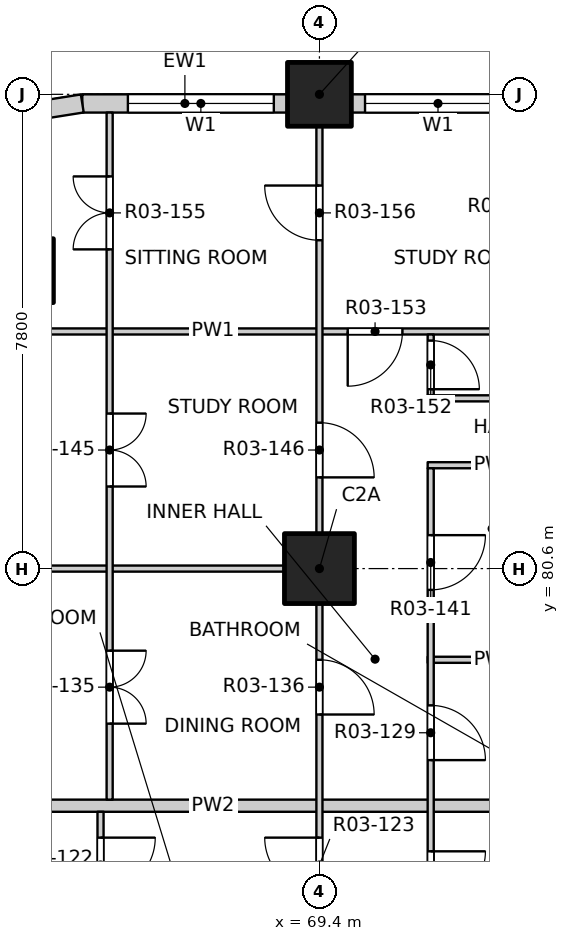
"""IFC4 building model, lengths in metres.
Left out: names, types, materials, properties, quantities, classifications, styles, units other than length and angle.
Written with IfcOpenShell. Run it as: python <this file> out.ifc"""

import sys

from ifc_helpers import new_model, si_unit, direction, frame, frame_2d, origin, origin_2d, place, context, subcontext, project, spatial, rectangle, extrude, element, fill, save


model = new_model("IFC4")
c1 = context("Model", 3, precision=1e-05, world=origin(), true_north=direction((0.0, 1.0)))
c2 = subcontext(c1, "Body", "Model", "MODEL_VIEW")
j1 = project(units=[si_unit("LENGTHUNIT", "METRE"), si_unit("PLANEANGLEUNIT", "RADIAN")], contexts=[c1])
p1 = place(None, origin())
s1 = spatial("IfcSite", under=j1, at=p1, CompositionType="ELEMENT")
p2 = place(p1, origin())
s2 = spatial("IfcBuilding", under=s1, at=p2, CompositionType="ELEMENT")
p3 = place(p2, frame((0.0, 0.0, 43.3)))
s3 = spatial("IfcBuildingStorey", under=s2, at=p3, CompositionType="ELEMENT", Elevation=43.3)
for number, where, z_axis, x_axis in (
    (1, (64.5, 85.5, -0.25), (0.0, 0.0, 1.0), (1.0, 0.0, 0.0)),
    (2, (69.4, 88.4, -0.25), (0.0, 0.0, 1.0), (1.0, 0.0, 0.0)),
):
    element("IfcColumn", number, at=place(p3, frame(where, z_axis=z_axis, x_axis=x_axis)), inside=s3, PredefinedType="COLUMN", context=c2, shape_type="SweptSolid", body=[
        extrude(rectangle(XDim=1.05, YDim=1.05, at=origin_2d()), origin(), (0.0, 0.0, 1.0), 3.35),
    ])
p4 = place(p3, frame((69.4, 80.6, -0.25), z_axis=(0.0, 0.0, 1.0), x_axis=(1.0, 0.0, 0.0)))
e3 = element("IfcColumn", 3, at=p4, inside=s3, PredefinedType="COLUMN", context=c2, shape_type="SweptSolid", body=[
    extrude(rectangle(XDim=1.15, YDim=1.15, at=origin_2d()), origin(), (0.0, 0.0, 1.0), 3.35),
])
p5 = place(p3, frame((65.5, 88.25, 0.0), z_axis=(0.0, 0.0, 1.0), x_axis=(1.0, 0.0, 0.0)))
e4 = element("IfcWall", 4, at=p5, inside=s3, PredefinedType="SOLIDWALL", context=c2, shape_type="SweptSolid", body=[
    extrude(rectangle(XDim=3.375, YDim=0.3, at=frame_2d((1.688, 0.0))), origin(), (0.0, 0.0, 1.0), 3.1),
])
p6 = place(p5, frame((0.75, 0.0, 0.9)))
e5 = element("IfcOpeningElement", 5, at=p6, cuts=e4, PredefinedType="OPENING", context=c2, shape_type="SweptSolid", body=[
    extrude(rectangle(XDim=2.4, YDim=1.8, at=frame_2d((1.2, 0.9))), frame((0.0, 0.16, 0.0), z_axis=(0.0, -1.0, 0.0), x_axis=(1.0, 0.0, 0.0)), (0.0, 0.0, 1.0), 0.32),
])
p7 = place(p3, frame((69.925, 88.25, 0.0), z_axis=(0.0, 0.0, 1.0), x_axis=(1.0, 0.0, 0.0)))
e6 = element("IfcWall", 6, at=p7, inside=s3, PredefinedType="SOLIDWALL", context=c2, shape_type="SweptSolid", body=[
    extrude(rectangle(XDim=6.75, YDim=0.3, at=frame_2d((3.375, 0.0))), origin(), (0.0, 0.0, 1.0), 3.1),
])
p8 = place(p7, frame((0.225, 0.0, 0.9)))
e7 = element("IfcOpeningElement", 7, at=p8, cuts=e6, PredefinedType="OPENING", context=c2, shape_type="SweptSolid", body=[
    extrude(rectangle(XDim=2.4, YDim=1.8, at=frame_2d((1.2, 0.9))), frame((0.0, 0.16, 0.0), z_axis=(0.0, -1.0, 0.0), x_axis=(1.0, 0.0, 0.0)), (0.0, 0.0, 1.0), 0.32),
])
p9 = place(p7, frame((4.125, 0.0, 0.9)))
e8 = element("IfcOpeningElement", 8, at=p9, cuts=e6, PredefinedType="OPENING", context=c2, shape_type="SweptSolid", body=[
    extrude(rectangle(XDim=2.4, YDim=1.8, at=frame_2d((1.2, 0.9))), frame((0.0, 0.16, 0.0), z_axis=(0.0, -1.0, 0.0), x_axis=(1.0, 0.0, 0.0)), (0.0, 0.0, 1.0), 0.32),
])
p10 = place(p3, frame((65.5, 88.25, 0.0), z_axis=(0.0, 0.0, 1.0), x_axis=(-0.987678452879, -0.156496880861, 0.0)))
e9 = element("IfcWall", 9, at=p10, inside=s3, PredefinedType="SOLIDWALL", context=c2, shape_type="SweptSolid", body=[
    extrude(rectangle(XDim=1.173, YDim=0.3, at=frame_2d((0.586, 0.0))), origin(), (0.0, 0.0, 1.0), 3.1),
])
p11 = place(p3, frame((61.9, 76.7, 0.0), z_axis=(0.0, 0.0, 1.0), x_axis=(1.0, 0.0, 0.0)))
e10 = element("IfcWall", 10, at=p11, inside=s3, PredefinedType="PARTITIONING", context=c2, shape_type="SweptSolid", body=[
    extrude(rectangle(XDim=11.5, YDim=0.2, at=frame_2d((5.75, 0.0))), origin(), (0.0, 0.0, 1.0), 3.1),
])
p12 = place(p3, frame((71.18, 79.1, 0.0), z_axis=(0.0, 0.0, 1.0), x_axis=(1.0, 0.0, 0.0)))
e11 = element("IfcWall", 11, at=p12, inside=s3, PredefinedType="PARTITIONING", context=c2, shape_type="SweptSolid", body=[
    extrude(rectangle(XDim=2.22, YDim=0.1, at=frame_2d((1.11, 0.0))), origin(), (0.0, 0.0, 1.0), 3.1),
])
p13 = place(p3, frame((61.9, 80.6, 0.0), z_axis=(0.0, 0.0, 1.0), x_axis=(1.0, 0.0, 0.0)))
e12 = element("IfcWall", 12, at=p13, inside=s3, PredefinedType="PARTITIONING", context=c2, shape_type="SweptSolid", body=[
    extrude(rectangle(XDim=7.55, YDim=0.1, at=frame_2d((3.775, 0.0))), origin(), (0.0, 0.0, 1.0), 3.1),
])
for number, where, z_axis, x_axis in (
    (13, (71.18, 82.3, 0.0), (0.0, 0.0, 1.0), (1.0, 0.0, 0.0)),
    (14, (71.18, 83.4, 0.0), (0.0, 0.0, 1.0), (1.0, 0.0, 0.0)),
):
    element("IfcWall", number, at=place(p3, frame(where, z_axis=z_axis, x_axis=x_axis)), inside=s3, PredefinedType="PARTITIONING", context=c2, shape_type="SweptSolid", body=[
        extrude(rectangle(XDim=2.22, YDim=0.1, at=frame_2d((1.11, 0.0))), origin(), (0.0, 0.0, 1.0), 3.1),
    ])
p14 = place(p3, frame((61.9, 84.5, 0.0), z_axis=(0.0, 0.0, 1.0), x_axis=(1.0, 0.0, 0.0)))
e15 = element("IfcWall", 15, at=p14, inside=s3, PredefinedType="PARTITIONING", context=c2, shape_type="SweptSolid", body=[
    extrude(rectangle(XDim=11.5, YDim=0.1, at=frame_2d((5.75, 0.0))), origin(), (0.0, 0.0, 1.0), 3.1),
])
p15 = place(p14, frame((7.965, 0.0, 0.0)))
e16 = element("IfcOpeningElement", 16, at=p15, cuts=e15, PredefinedType="OPENING", context=c2, shape_type="SweptSolid", body=[
    extrude(rectangle(XDim=0.9, YDim=2.1, at=frame_2d((0.45, 1.05))), frame((0.0, 0.06, 0.0), z_axis=(0.0, -1.0, 0.0), x_axis=(1.0, 0.0, 0.0)), (0.0, 0.0, 1.0), 0.12),
])
p16 = place(p3, frame((65.8, 69.0, 0.0), z_axis=(0.0, 0.0, 1.0), x_axis=(0.0, 1.0, 0.0)))
e17 = element("IfcWall", 17, at=p16, inside=s3, PredefinedType="PARTITIONING", context=c2, shape_type="SweptSolid", body=[
    extrude(rectangle(XDim=7.6, YDim=0.1, at=frame_2d((3.8, 0.0))), origin(), (0.0, 0.0, 1.0), 3.1),
])
p17 = place(p16, frame((1.25, 0.0, 0.0)))
e18 = element("IfcOpeningElement", 18, at=p17, cuts=e17, PredefinedType="OPENING", context=c2, shape_type="SweptSolid", body=[
    extrude(rectangle(XDim=1.2, YDim=2.1, at=frame_2d((0.6, 1.05))), frame((0.0, 0.06, 0.0), z_axis=(0.0, -1.0, 0.0), x_axis=(1.0, 0.0, 0.0)), (0.0, 0.0, 1.0), 0.12),
])
p18 = place(p16, frame((4.325, 0.0, 0.0)))
e19 = element("IfcOpeningElement", 19, at=p18, cuts=e17, PredefinedType="OPENING", context=c2, shape_type="SweptSolid", body=[
    extrude(rectangle(XDim=0.9, YDim=2.1, at=frame_2d((0.45, 1.05))), frame((0.0, 0.06, 0.0), z_axis=(0.0, -1.0, 0.0), x_axis=(1.0, 0.0, 0.0)), (0.0, 0.0, 1.0), 0.12),
])
p19 = place(p16, frame((6.275, 0.0, 0.0)))
e20 = element("IfcOpeningElement", 20, at=p19, cuts=e17, PredefinedType="OPENING", context=c2, shape_type="SweptSolid", body=[
    extrude(rectangle(XDim=0.9, YDim=2.1, at=frame_2d((0.45, 1.05))), frame((0.0, 0.06, 0.0), z_axis=(0.0, -1.0, 0.0), x_axis=(1.0, 0.0, 0.0)), (0.0, 0.0, 1.0), 0.12),
])
p20 = place(p3, frame((65.95, 76.8, 0.0), z_axis=(0.0, 0.0, 1.0), x_axis=(0.0, 1.0, 0.0)))
e21 = element("IfcWall", 21, at=p20, inside=s3, PredefinedType="PARTITIONING", context=c2, shape_type="SweptSolid", body=[
    extrude(rectangle(XDim=11.3, YDim=0.1, at=frame_2d((5.65, 0.0))), origin(), (0.0, 0.0, 1.0), 3.1),
])
p21 = place(p20, frame((1.25, 0.0, 0.0)))
e22 = element("IfcOpeningElement", 22, at=p21, cuts=e21, PredefinedType="OPENING", context=c2, shape_type="SweptSolid", body=[
    extrude(rectangle(XDim=1.2, YDim=2.1, at=frame_2d((0.6, 1.05))), frame((0.0, 0.06, 0.0), z_axis=(0.0, -1.0, 0.0), x_axis=(1.0, 0.0, 0.0)), (0.0, 0.0, 1.0), 0.12),
])
p22 = place(p20, frame((5.15, 0.0, 0.0)))
e23 = element("IfcOpeningElement", 23, at=p22, cuts=e21, PredefinedType="OPENING", context=c2, shape_type="SweptSolid", body=[
    extrude(rectangle(XDim=1.2, YDim=2.1, at=frame_2d((0.6, 1.05))), frame((0.0, 0.06, 0.0), z_axis=(0.0, -1.0, 0.0), x_axis=(1.0, 0.0, 0.0)), (0.0, 0.0, 1.0), 0.12),
])
p23 = place(p20, frame((9.05, 0.0, 0.0)))
e24 = element("IfcOpeningElement", 24, at=p23, cuts=e21, PredefinedType="OPENING", context=c2, shape_type="SweptSolid", body=[
    extrude(rectangle(XDim=1.2, YDim=2.1, at=frame_2d((0.6, 1.05))), frame((0.0, 0.06, 0.0), z_axis=(0.0, -1.0, 0.0), x_axis=(1.0, 0.0, 0.0)), (0.0, 0.0, 1.0), 0.12),
])
p24 = place(p3, frame((69.4, 41.9, 0.0), z_axis=(0.0, 0.0, 1.0), x_axis=(0.0, 1.0, 0.0)))
e25 = element("IfcWall", 25, at=p24, inside=s3, PredefinedType="PARTITIONING", context=c2, shape_type="SweptSolid", body=[
    extrude(rectangle(XDim=46.2, YDim=0.1, at=frame_2d((23.1, 0.0))), origin(), (0.0, 0.0, 1.0), 3.1),
])
p25 = place(p24, frame((1.2, 0.0, 0.0)))
e26 = element("IfcOpeningElement", 26, at=p25, cuts=e25, PredefinedType="OPENING", context=c2, shape_type="SweptSolid", body=[
    extrude(rectangle(XDim=0.9, YDim=2.1, at=frame_2d((0.45, 1.05))), frame((0.0, 0.06, 0.0), z_axis=(0.0, -1.0, 0.0), x_axis=(1.0, 0.0, 0.0)), (0.0, 0.0, 1.0), 0.12),
])
p26 = place(p24, frame((5.9, 0.0, 0.0)))
e27 = element("IfcOpeningElement", 27, at=p26, cuts=e25, PredefinedType="OPENING", context=c2, shape_type="SweptSolid", body=[
    extrude(rectangle(XDim=0.9, YDim=2.1, at=frame_2d((0.45, 1.05))), frame((0.0, 0.06, 0.0), z_axis=(0.0, -1.0, 0.0), x_axis=(1.0, 0.0, 0.0)), (0.0, 0.0, 1.0), 0.12),
])
p27 = place(p24, frame((9.0, 0.0, 0.0)))
e28 = element("IfcOpeningElement", 28, at=p27, cuts=e25, PredefinedType="OPENING", context=c2, shape_type="SweptSolid", body=[
    extrude(rectangle(XDim=0.9, YDim=2.1, at=frame_2d((0.45, 1.05))), frame((0.0, 0.06, 0.0), z_axis=(0.0, -1.0, 0.0), x_axis=(1.0, 0.0, 0.0)), (0.0, 0.0, 1.0), 0.12),
])
p28 = place(p24, frame((13.725, 0.0, 0.0)))
e29 = element("IfcOpeningElement", 29, at=p28, cuts=e25, PredefinedType="OPENING", context=c2, shape_type="SweptSolid", body=[
    extrude(rectangle(XDim=0.9, YDim=2.1, at=frame_2d((0.45, 1.05))), frame((0.0, 0.06, 0.0), z_axis=(0.0, -1.0, 0.0), x_axis=(1.0, 0.0, 0.0)), (0.0, 0.0, 1.0), 0.12),
])
p29 = place(p24, frame((17.775, 0.0, 0.0)))
e30 = element("IfcOpeningElement", 30, at=p29, cuts=e25, PredefinedType="OPENING", context=c2, shape_type="SweptSolid", body=[
    extrude(rectangle(XDim=0.9, YDim=2.1, at=frame_2d((0.45, 1.05))), frame((0.0, 0.06, 0.0), z_axis=(0.0, -1.0, 0.0), x_axis=(1.0, 0.0, 0.0)), (0.0, 0.0, 1.0), 0.12),
])
p30 = place(p24, frame((20.7, 0.0, 0.0)))
e31 = element("IfcOpeningElement", 31, at=p30, cuts=e25, PredefinedType="OPENING", context=c2, shape_type="SweptSolid", body=[
    extrude(rectangle(XDim=0.9, YDim=2.1, at=frame_2d((0.45, 1.05))), frame((0.0, 0.06, 0.0), z_axis=(0.0, -1.0, 0.0), x_axis=(1.0, 0.0, 0.0)), (0.0, 0.0, 1.0), 0.12),
])
p31 = place(p24, frame((25.575, 0.0, 0.0)))
e32 = element("IfcOpeningElement", 32, at=p31, cuts=e25, PredefinedType="OPENING", context=c2, shape_type="SweptSolid", body=[
    extrude(rectangle(XDim=0.9, YDim=2.1, at=frame_2d((0.45, 1.05))), frame((0.0, 0.06, 0.0), z_axis=(0.0, -1.0, 0.0), x_axis=(1.0, 0.0, 0.0)), (0.0, 0.0, 1.0), 0.12),
])
p32 = place(p24, frame((28.5, 0.0, 0.0)))
e33 = element("IfcOpeningElement", 33, at=p32, cuts=e25, PredefinedType="OPENING", context=c2, shape_type="SweptSolid", body=[
    extrude(rectangle(XDim=0.9, YDim=2.1, at=frame_2d((0.45, 1.05))), frame((0.0, 0.06, 0.0), z_axis=(0.0, -1.0, 0.0), x_axis=(1.0, 0.0, 0.0)), (0.0, 0.0, 1.0), 0.12),
])
p33 = place(p24, frame((33.375, 0.0, 0.0)))
e34 = element("IfcOpeningElement", 34, at=p33, cuts=e25, PredefinedType="OPENING", context=c2, shape_type="SweptSolid", body=[
    extrude(rectangle(XDim=0.9, YDim=2.1, at=frame_2d((0.45, 1.05))), frame((0.0, 0.06, 0.0), z_axis=(0.0, -1.0, 0.0), x_axis=(1.0, 0.0, 0.0)), (0.0, 0.0, 1.0), 0.12),
])
p34 = place(p24, frame((36.3, 0.0, 0.0)))
e35 = element("IfcOpeningElement", 35, at=p34, cuts=e25, PredefinedType="OPENING", context=c2, shape_type="SweptSolid", body=[
    extrude(rectangle(XDim=0.9, YDim=2.1, at=frame_2d((0.45, 1.05))), frame((0.0, 0.06, 0.0), z_axis=(0.0, -1.0, 0.0), x_axis=(1.0, 0.0, 0.0)), (0.0, 0.0, 1.0), 0.12),
])
p35 = place(p24, frame((40.2, 0.0, 0.0)))
e36 = element("IfcOpeningElement", 36, at=p35, cuts=e25, PredefinedType="OPENING", context=c2, shape_type="SweptSolid", body=[
    extrude(rectangle(XDim=0.9, YDim=2.1, at=frame_2d((0.45, 1.05))), frame((0.0, 0.06, 0.0), z_axis=(0.0, -1.0, 0.0), x_axis=(1.0, 0.0, 0.0)), (0.0, 0.0, 1.0), 0.12),
])
p36 = place(p24, frame((44.1, 0.0, 0.0)))
e37 = element("IfcOpeningElement", 37, at=p36, cuts=e25, PredefinedType="OPENING", context=c2, shape_type="SweptSolid", body=[
    extrude(rectangle(XDim=0.9, YDim=2.1, at=frame_2d((0.45, 1.05))), frame((0.0, 0.06, 0.0), z_axis=(0.0, -1.0, 0.0), x_axis=(1.0, 0.0, 0.0)), (0.0, 0.0, 1.0), 0.12),
])
p37 = place(p3, frame((71.23, 71.3, 0.0), z_axis=(0.0, 0.0, 1.0), x_axis=(0.0, 1.0, 0.0)))
e38 = element("IfcWall", 38, at=p37, inside=s3, PredefinedType="PARTITIONING", context=c2, shape_type="SweptSolid", body=[
    extrude(rectangle(XDim=10.95, YDim=0.1, at=frame_2d((5.475, 0.0))), origin(), (0.0, 0.0, 1.0), 3.1),
])
p38 = place(p37, frame((1.025, 0.0, 0.0)))
e39 = element("IfcOpeningElement", 39, at=p38, cuts=e38, PredefinedType="OPENING", context=c2, shape_type="SweptSolid", body=[
    extrude(rectangle(XDim=0.9, YDim=2.1, at=frame_2d((0.45, 1.05))), frame((0.0, 0.06, 0.0), z_axis=(0.0, -1.0, 0.0), x_axis=(1.0, 0.0, 0.0)), (0.0, 0.0, 1.0), 0.12),
])
p39 = place(p37, frame((3.75, 0.0, 0.0)))
e40 = element("IfcOpeningElement", 40, at=p39, cuts=e38, PredefinedType="OPENING", context=c2, shape_type="SweptSolid", body=[
    extrude(rectangle(XDim=0.9, YDim=2.1, at=frame_2d((0.45, 1.05))), frame((0.0, 0.06, 0.0), z_axis=(0.0, -1.0, 0.0), x_axis=(1.0, 0.0, 0.0)), (0.0, 0.0, 1.0), 0.12),
])
p40 = place(p37, frame((6.15, 0.0, 0.0)))
e41 = element("IfcOpeningElement", 41, at=p40, cuts=e38, PredefinedType="OPENING", context=c2, shape_type="SweptSolid", body=[
    extrude(rectangle(XDim=0.9, YDim=2.1, at=frame_2d((0.45, 1.05))), frame((0.0, 0.06, 0.0), z_axis=(0.0, -1.0, 0.0), x_axis=(1.0, 0.0, 0.0)), (0.0, 0.0, 1.0), 0.12),
])
p41 = place(p37, frame((8.95, 0.0, 0.0)))
e42 = element("IfcOpeningElement", 42, at=p41, cuts=e38, PredefinedType="OPENING", context=c2, shape_type="SweptSolid", body=[
    extrude(rectangle(XDim=0.9, YDim=2.1, at=frame_2d((0.45, 1.05))), frame((0.0, 0.06, 0.0), z_axis=(0.0, -1.0, 0.0), x_axis=(1.0, 0.0, 0.0)), (0.0, 0.0, 1.0), 0.12),
])
p42 = place(p3, frame((71.23, 83.45, 0.0), z_axis=(0.0, 0.0, 1.0), x_axis=(0.0, 1.0, 0.0)))
e43 = element("IfcWall", 43, at=p42, inside=s3, PredefinedType="PARTITIONING", context=c2, shape_type="SweptSolid", body=[
    extrude(rectangle(XDim=1.0, YDim=0.1, at=frame_2d((0.5, 0.0))), origin(), (0.0, 0.0, 1.0), 3.1),
])
p43 = place(p42, frame((0.1, 0.0, 0.0)))
e44 = element("IfcOpeningElement", 44, at=p43, cuts=e43, PredefinedType="OPENING", context=c2, shape_type="SweptSolid", body=[
    extrude(rectangle(XDim=0.8, YDim=2.1, at=frame_2d((0.4, 1.05))), frame((0.0, 0.06, 0.0), z_axis=(0.0, -1.0, 0.0), x_axis=(1.0, 0.0, 0.0)), (0.0, 0.0, 1.0), 0.12),
])
p44 = place(p6, origin())
e45 = element("IfcWindow", 45, at=p44, inside=s3, PartitioningType="DOUBLE_PANEL_VERTICAL", PredefinedType="WINDOW", context=c2, shape_type="SweptSolid", body=[
    extrude(rectangle(XDim=2.4, YDim=1.8, at=frame_2d((1.2, 0.9))), frame((0.0, 0.03, 0.0), z_axis=(0.0, -1.0, 0.0), x_axis=(1.0, 0.0, 0.0)), (0.0, 0.0, 1.0), 0.06),
])
fill(e5, e45)
p45 = place(p8, origin())
e46 = element("IfcWindow", 46, at=p45, inside=s3, PartitioningType="DOUBLE_PANEL_VERTICAL", PredefinedType="WINDOW", context=c2, shape_type="SweptSolid", body=[
    extrude(rectangle(XDim=2.4, YDim=1.8, at=frame_2d((1.2, 0.9))), frame((0.0, 0.03, 0.0), z_axis=(0.0, -1.0, 0.0), x_axis=(1.0, 0.0, 0.0)), (0.0, 0.0, 1.0), 0.06),
])
fill(e7, e46)
p46 = place(p39, origin())
e47 = element("IfcDoor", 47, at=p46, inside=s3, OperationType="SINGLE_SWING_LEFT", PredefinedType="DOOR", context=c2, shape_type="SweptSolid", body=[
    extrude(rectangle(XDim=0.9, YDim=2.1, at=frame_2d((0.45, 1.05))), frame((0.0, 0.025, 0.0), z_axis=(0.0, -1.0, 0.0), x_axis=(1.0, 0.0, 0.0)), (0.0, 0.0, 1.0), 0.05),
])
fill(e40, e47)
p47 = place(p19, origin())
e48 = element("IfcDoor", 48, at=p47, inside=s3, OperationType="SINGLE_SWING_LEFT", PredefinedType="DOOR", context=c2, shape_type="SweptSolid", body=[
    extrude(rectangle(XDim=0.9, YDim=2.1, at=frame_2d((0.45, 1.05))), frame((0.0, 0.025, 0.0), z_axis=(0.0, -1.0, 0.0), x_axis=(1.0, 0.0, 0.0)), (0.0, 0.0, 1.0), 0.05),
])
fill(e20, e48)
p48 = place(p33, origin())
e49 = element("IfcDoor", 49, at=p48, inside=s3, OperationType="SINGLE_SWING_RIGHT", PredefinedType="DOOR", context=c2, shape_type="SweptSolid", body=[
    extrude(rectangle(XDim=0.9, YDim=2.1, at=frame_2d((0.45, 1.05))), frame((0.0, 0.025, 0.0), z_axis=(0.0, -1.0, 0.0), x_axis=(1.0, 0.0, 0.0)), (0.0, 0.0, 1.0), 0.05),
])
fill(e34, e49)
p49 = place(p40, origin())
e50 = element("IfcDoor", 50, at=p49, inside=s3, OperationType="SINGLE_SWING_RIGHT", PredefinedType="DOOR", context=c2, shape_type="SweptSolid", body=[
    extrude(rectangle(XDim=0.9, YDim=2.1, at=frame_2d((0.45, 1.05))), frame((0.0, 0.025, 0.0), z_axis=(0.0, -1.0, 0.0), x_axis=(1.0, 0.0, 0.0)), (0.0, 0.0, 1.0), 0.05),
])
fill(e41, e50)
p50 = place(p21, origin())
e51 = element("IfcDoor", 51, at=p50, inside=s3, OperationType="DOUBLE_DOOR_SINGLE_SWING", PredefinedType="DOOR", context=c2, shape_type="SweptSolid", body=[
    extrude(rectangle(XDim=1.2, YDim=2.1, at=frame_2d((0.6, 1.05))), frame((0.0, 0.025, 0.0), z_axis=(0.0, -1.0, 0.0), x_axis=(1.0, 0.0, 0.0)), (0.0, 0.0, 1.0), 0.05),
])
fill(e22, e51)
p51 = place(p34, origin())
e52 = element("IfcDoor", 52, at=p51, inside=s3, OperationType="SINGLE_SWING_RIGHT", PredefinedType="DOOR", context=c2, shape_type="SweptSolid", body=[
    extrude(rectangle(XDim=0.9, YDim=2.1, at=frame_2d((0.45, 1.05))), frame((0.0, 0.025, 0.0), z_axis=(0.0, -1.0, 0.0), x_axis=(1.0, 0.0, 0.0)), (0.0, 0.0, 1.0), 0.05),
])
fill(e35, e52)
p52 = place(p41, origin())
e53 = element("IfcDoor", 53, at=p52, inside=s3, OperationType="SINGLE_SWING_LEFT", PredefinedType="DOOR", context=c2, shape_type="SweptSolid", body=[
    extrude(rectangle(XDim=0.9, YDim=2.1, at=frame_2d((0.45, 1.05))), frame((0.0, 0.025, 0.0), z_axis=(0.0, -1.0, 0.0), x_axis=(1.0, 0.0, 0.0)), (0.0, 0.0, 1.0), 0.05),
])
fill(e42, e53)
p53 = place(p22, origin())
e54 = element("IfcDoor", 54, at=p53, inside=s3, OperationType="DOUBLE_DOOR_SINGLE_SWING", PredefinedType="DOOR", context=c2, shape_type="SweptSolid", body=[
    extrude(rectangle(XDim=1.2, YDim=2.1, at=frame_2d((0.6, 1.05))), frame((0.0, 0.025, 0.0), z_axis=(0.0, -1.0, 0.0), x_axis=(1.0, 0.0, 0.0)), (0.0, 0.0, 1.0), 0.05),
])
fill(e23, e54)
p54 = place(p35, origin())
e55 = element("IfcDoor", 55, at=p54, inside=s3, OperationType="SINGLE_SWING_RIGHT", PredefinedType="DOOR", context=c2, shape_type="SweptSolid", body=[
    extrude(rectangle(XDim=0.9, YDim=2.1, at=frame_2d((0.45, 1.05))), frame((0.0, 0.025, 0.0), z_axis=(0.0, -1.0, 0.0), x_axis=(1.0, 0.0, 0.0)), (0.0, 0.0, 1.0), 0.05),
])
fill(e36, e55)
p55 = place(p43, origin())
e56 = element("IfcDoor", 56, at=p55, inside=s3, OperationType="SINGLE_SWING_RIGHT", PredefinedType="DOOR", context=c2, shape_type="SweptSolid", body=[
    extrude(rectangle(XDim=0.8, YDim=2.1, at=frame_2d((0.4, 1.05))), frame((0.0, 0.025, 0.0), z_axis=(0.0, -1.0, 0.0), x_axis=(1.0, 0.0, 0.0)), (0.0, 0.0, 1.0), 0.05),
])
fill(e44, e56)
p56 = place(p15, origin())
e57 = element("IfcDoor", 57, at=p56, inside=s3, OperationType="SINGLE_SWING_RIGHT", PredefinedType="DOOR", context=c2, shape_type="SweptSolid", body=[
    extrude(rectangle(XDim=0.9, YDim=2.1, at=frame_2d((0.45, 1.05))), frame((0.0, 0.025, 0.0), z_axis=(0.0, -1.0, 0.0), x_axis=(1.0, 0.0, 0.0)), (0.0, 0.0, 1.0), 0.05),
])
fill(e16, e57)
p57 = place(p23, origin())
e58 = element("IfcDoor", 58, at=p57, inside=s3, OperationType="DOUBLE_DOOR_SINGLE_SWING", PredefinedType="DOOR", context=c2, shape_type="SweptSolid", body=[
    extrude(rectangle(XDim=1.2, YDim=2.1, at=frame_2d((0.6, 1.05))), frame((0.0, 0.025, 0.0), z_axis=(0.0, -1.0, 0.0), x_axis=(1.0, 0.0, 0.0)), (0.0, 0.0, 1.0), 0.05),
])
fill(e24, e58)
p58 = place(p36, origin())
e59 = element("IfcDoor", 59, at=p58, inside=s3, OperationType="SINGLE_SWING_RIGHT", PredefinedType="DOOR", context=c2, shape_type="SweptSolid", body=[
    extrude(rectangle(XDim=0.9, YDim=2.1, at=frame_2d((0.45, 1.05))), frame((0.0, 0.025, 0.0), z_axis=(0.0, -1.0, 0.0), x_axis=(1.0, 0.0, 0.0)), (0.0, 0.0, 1.0), 0.05),
])
fill(e37, e59)
save(model, sys.argv[1])
